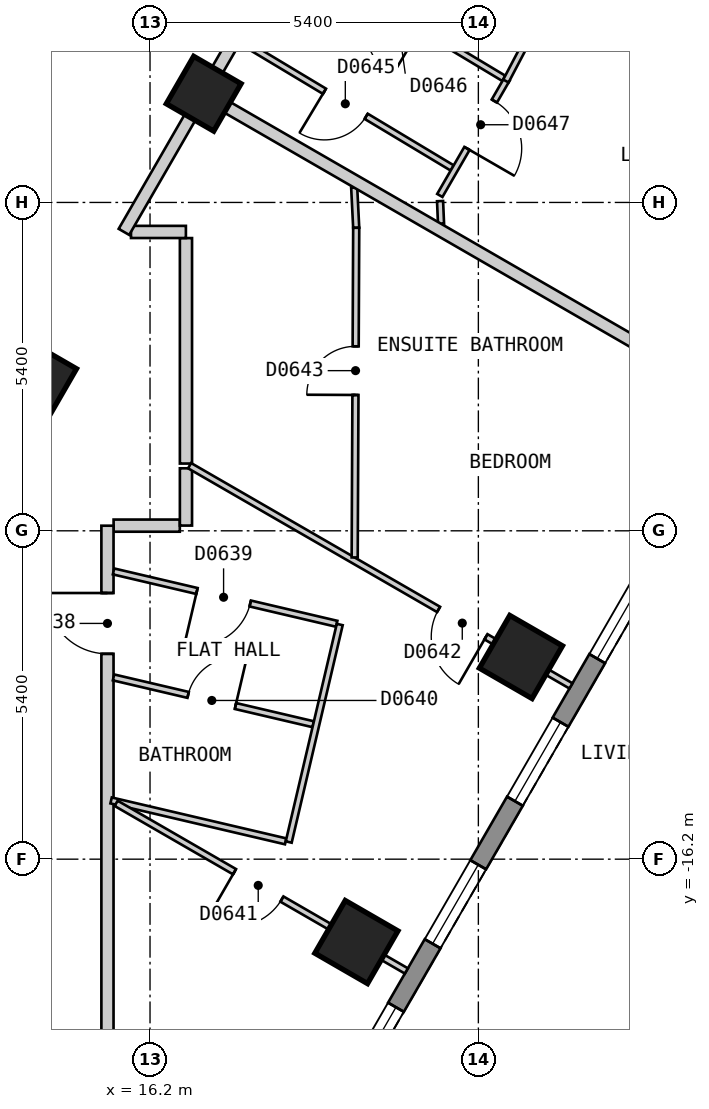
"""IFC4 building model, lengths in metres.
Left out: names, types, materials, properties, quantities, classifications, styles, units other than length and angle.
Written with IfcOpenShell. Run it as: python <this file> out.ifc"""

import sys

from ifc_helpers import new_model, si_unit, direction, frame, frame_2d, origin, origin_2d, place, context, subcontext, project, spatial, polyline, rectangle, outline, extrude, element, fill, save


model = new_model("IFC4")
c1 = context("Model", 3, precision=1e-05, world=origin(), true_north=direction((0.0, 1.0)))
c2 = subcontext(c1, "Body", "Model", "MODEL_VIEW")
j1 = project(units=[si_unit("LENGTHUNIT", "METRE"), si_unit("PLANEANGLEUNIT", "RADIAN")], contexts=[c1])
p1 = place(None, origin())
s1 = spatial("IfcSite", under=j1, at=p1, CompositionType="ELEMENT")
p2 = place(p1, origin())
s2 = spatial("IfcBuilding", under=s1, at=p2, CompositionType="ELEMENT")
p3 = place(p2, frame((0.0, 0.0, 75.0)))
s3 = spatial("IfcBuildingStorey", under=s2, at=p3, CompositionType="ELEMENT", Elevation=75.0)
for number, where, z_axis, x_axis in (
    (1, (19.594, -17.563, 0.0), (0.0, 0.0, 1.0), (0.5, 0.866, 0.0)),
    (2, (22.3, -12.875, 0.0), (0.0, 0.0, 1.0), (0.5, 0.866, 0.0)),
):
    element("IfcColumn", number, at=place(p3, frame(where, z_axis=z_axis, x_axis=x_axis)), inside=s3, PredefinedType="COLUMN", context=c2, shape_type="SweptSolid", body=[
        extrude(rectangle(XDim=1.0, YDim=1.0, at=origin_2d()), origin(), (0.0, 0.0, 1.0), 3.0),
    ])
for number, where, z_axis, x_axis in (
    (3, (14.376, -8.3, 0.0), (0.0, 0.0, 1.0), (0.5, 0.866, 0.0)),
    (4, (17.083, -3.612, 0.0), (0.0, 0.0, 1.0), (0.5, 0.866, 0.0)),
):
    element("IfcColumn", number, at=place(p3, frame(where, z_axis=z_axis, x_axis=x_axis)), inside=s3, PredefinedType="COLUMN", context=c2, shape_type="SweptSolid", body=[
        extrude(rectangle(XDim=0.9, YDim=0.9, at=origin_2d()), origin(), (0.0, 0.0, 1.0), 3.0),
    ])
p4 = place(p3, frame((17.479, -23.425, 0.0), z_axis=(0.0, 0.0, 1.0), x_axis=(0.500035407905, 0.866004960056, 0.0)))
e5 = element("IfcWall", 5, at=p4, inside=s3, PredefinedType="SOLIDWALL", context=c2, shape_type="SweptSolid", body=[
    extrude(outline(polyline([(0.0, -0.15), (23.094, -0.15), (23.014, 0.15), (0.08, 0.15), (0.0, -0.15)])), origin(), (0.0, 0.0, 1.0), 2.7),
])
p5 = place(p4, frame((1.324, 0.0, 0.15)))
e6 = element("IfcOpeningElement", 6, at=p5, cuts=e5, PredefinedType="OPENING", context=c2, shape_type="SweptSolid", body=[
    extrude(rectangle(XDim=1.5, YDim=2.1, at=frame_2d((0.75, 1.05))), frame((0.0, 0.16, 0.0), z_axis=(0.0, -1.0, 0.0), x_axis=(1.0, 0.0, 0.0)), (0.0, 0.0, 1.0), 0.32),
])
p6 = place(p4, frame((4.031, 0.0, 0.15)))
e7 = element("IfcOpeningElement", 7, at=p6, cuts=e5, PredefinedType="OPENING", context=c2, shape_type="SweptSolid", body=[
    extrude(rectangle(XDim=1.5, YDim=2.1, at=frame_2d((0.75, 1.05))), frame((0.0, 0.16, 0.0), z_axis=(0.0, -1.0, 0.0), x_axis=(1.0, 0.0, 0.0)), (0.0, 0.0, 1.0), 0.32),
])
p7 = place(p4, frame((6.737, 0.0, 0.15)))
e8 = element("IfcOpeningElement", 8, at=p7, cuts=e5, PredefinedType="OPENING", context=c2, shape_type="SweptSolid", body=[
    extrude(rectangle(XDim=1.5, YDim=2.1, at=frame_2d((0.75, 1.05))), frame((0.0, 0.16, 0.0), z_axis=(0.0, -1.0, 0.0), x_axis=(1.0, 0.0, 0.0)), (0.0, 0.0, 1.0), 0.32),
])
p8 = place(p4, frame((9.444, 0.0, 0.15)))
e9 = element("IfcOpeningElement", 9, at=p8, cuts=e5, PredefinedType="OPENING", context=c2, shape_type="SweptSolid", body=[
    extrude(rectangle(XDim=1.5, YDim=2.1, at=frame_2d((0.75, 1.05))), frame((0.0, 0.16, 0.0), z_axis=(0.0, -1.0, 0.0), x_axis=(1.0, 0.0, 0.0)), (0.0, 0.0, 1.0), 0.32),
])
p9 = place(p4, frame((12.151, 0.0, 0.15)))
e10 = element("IfcOpeningElement", 10, at=p9, cuts=e5, PredefinedType="OPENING", context=c2, shape_type="SweptSolid", body=[
    extrude(rectangle(XDim=1.5, YDim=2.1, at=frame_2d((0.75, 1.05))), frame((0.0, 0.16, 0.0), z_axis=(0.0, -1.0, 0.0), x_axis=(1.0, 0.0, 0.0)), (0.0, 0.0, 1.0), 0.32),
])
p10 = place(p4, frame((14.857, 0.0, 0.15)))
e11 = element("IfcOpeningElement", 11, at=p10, cuts=e5, PredefinedType="OPENING", context=c2, shape_type="SweptSolid", body=[
    extrude(rectangle(XDim=1.5, YDim=2.1, at=frame_2d((0.75, 1.05))), frame((0.0, 0.16, 0.0), z_axis=(0.0, -1.0, 0.0), x_axis=(1.0, 0.0, 0.0)), (0.0, 0.0, 1.0), 0.32),
])
p11 = place(p4, frame((17.564, 0.0, 0.15)))
e12 = element("IfcOpeningElement", 12, at=p11, cuts=e5, PredefinedType="OPENING", context=c2, shape_type="SweptSolid", body=[
    extrude(rectangle(XDim=1.5, YDim=2.1, at=frame_2d((0.75, 1.05))), frame((0.0, 0.16, 0.0), z_axis=(0.0, -1.0, 0.0), x_axis=(1.0, 0.0, 0.0)), (0.0, 0.0, 1.0), 0.32),
])
p12 = place(p4, frame((20.271, 0.0, 0.15)))
e13 = element("IfcOpeningElement", 13, at=p12, cuts=e5, PredefinedType="OPENING", context=c2, shape_type="SweptSolid", body=[
    extrude(rectangle(XDim=1.5, YDim=2.1, at=frame_2d((0.75, 1.05))), frame((0.0, 0.16, 0.0), z_axis=(0.0, -1.0, 0.0), x_axis=(1.0, 0.0, 0.0)), (0.0, 0.0, 1.0), 0.32),
])
p13 = place(p3, frame((16.791, -5.986, 0.0), z_axis=(0.0, 0.0, 1.0), x_axis=(0.0, -1.0, 0.0)))
e14 = element("IfcWall", 14, at=p13, inside=s3, PredefinedType="PARTITIONING", context=c2, shape_type="SweptSolid", body=[
    extrude(rectangle(XDim=3.708, YDim=0.2, at=frame_2d((1.854, 0.0))), origin(), (0.0, 0.0, 1.0), 2.7),
])
p14 = place(p3, frame((15.887, -5.885, 0.0), z_axis=(0.0, 0.0, 1.0), x_axis=(1.0, 0.0, 0.0)))
e15 = element("IfcWall", 15, at=p14, inside=s3, PredefinedType="PARTITIONING", context=c2, shape_type="SweptSolid", body=[
    extrude(rectangle(XDim=0.903, YDim=0.2, at=frame_2d((0.452, 0.0))), origin(), (0.0, 0.0, 1.0), 2.7),
])
p15 = place(p3, frame((15.601, -10.715, 0.0), z_axis=(0.0, 0.0, 1.0), x_axis=(1.0, 0.0, 0.0)))
e16 = element("IfcWall", 16, at=p15, inside=s3, PredefinedType="PARTITIONING", context=c2, shape_type="SweptSolid", body=[
    extrude(rectangle(XDim=1.089, YDim=0.2, at=frame_2d((0.544, 0.0))), origin(), (0.0, 0.0, 1.0), 2.7),
])
p16 = place(p3, frame((15.771, -5.884, 0.0), z_axis=(0.0, 0.0, 1.0), x_axis=(0.499939494019, 0.866060334111, 0.0)))
e17 = element("IfcWall", 17, at=p16, inside=s3, PredefinedType="PARTITIONING", context=c2, shape_type="SweptSolid", body=[
    extrude(rectangle(XDim=5.583, YDim=0.2, at=frame_2d((2.792, 0.0))), origin(), (0.0, 0.0, 1.0), 2.7),
])
p17 = place(p16, frame((4.03, 0.0, 0.0)))
e18 = element("IfcOpeningElement", 18, at=p17, cuts=e17, PredefinedType="OPENING", context=c2, shape_type="SweptSolid", body=[
    extrude(rectangle(XDim=1.0, YDim=2.1, at=frame_2d((0.5, 1.05))), frame((0.0, 0.11, 0.0), z_axis=(0.0, -1.0, 0.0), x_axis=(1.0, 0.0, 0.0)), (0.0, 0.0, 1.0), 0.22),
])
p18 = place(p3, frame((15.5, -21.199, 0.0), z_axis=(0.0, 0.0, 1.0), x_axis=(0.0, 1.0, 0.0)))
e19 = element("IfcWall", 19, at=p18, inside=s3, PredefinedType="PARTITIONING", context=c2, shape_type="SweptSolid", body=[
    extrude(rectangle(XDim=10.483, YDim=0.2, at=frame_2d((5.241, 0.0))), origin(), (0.0, 0.0, 1.0), 2.7),
])
p19 = place(p18, frame((8.376, 0.0, 0.0)))
e20 = element("IfcOpeningElement", 20, at=p19, cuts=e19, PredefinedType="OPENING", context=c2, shape_type="SweptSolid", body=[
    extrude(rectangle(XDim=1.0, YDim=2.1, at=frame_2d((0.5, 1.05))), frame((0.0, 0.11, 0.0), z_axis=(0.0, -1.0, 0.0), x_axis=(1.0, 0.0, 0.0)), (0.0, 0.0, 1.0), 0.22),
])
p20 = place(p3, frame((16.791, -10.714, 0.0), z_axis=(0.0, 0.0, 1.0), x_axis=(0.0, 1.0, 0.0)))
e21 = element("IfcWall", 21, at=p20, inside=s3, PredefinedType="PARTITIONING", context=c2, shape_type="SweptSolid", body=[
    extrude(rectangle(XDim=0.942, YDim=0.2, at=frame_2d((0.471, 0.0))), origin(), (0.0, 0.0, 1.0), 2.7),
])
p21 = place(p3, frame((19.558, -5.156, 0.0), z_axis=(0.0, 0.0, 1.0), x_axis=(0.04980880462, -0.998758771167, 0.0)))
e22 = element("IfcWall", 22, at=p21, inside=s3, PredefinedType="PARTITIONING", context=c2, shape_type="SweptSolid", body=[
    extrude(rectangle(XDim=0.662, YDim=0.1, at=frame_2d((0.331, 0.0))), origin(), (0.0, 0.0, 1.0), 2.7),
])
p22 = place(p3, frame((20.97, -5.378, 0.0), z_axis=(0.0, 0.0, 1.0), x_axis=(0.043266532348, -0.999063565134, 0.0)))
e23 = element("IfcWall", 23, at=p22, inside=s3, PredefinedType="PARTITIONING", context=c2, shape_type="SweptSolid", body=[
    extrude(rectangle(XDim=0.372, YDim=0.1, at=frame_2d((0.186, 0.0))), origin(), (0.0, 0.0, 1.0), 2.7),
])
p23 = place(p3, frame((15.6, -11.468, 0.0), z_axis=(0.0, 0.0, 1.0), x_axis=(0.973560523801, -0.228429215503, 0.0)))
e24 = element("IfcWall", 24, at=p23, inside=s3, PredefinedType="PARTITIONING", context=c2, shape_type="SweptSolid", body=[
    extrude(rectangle(XDim=3.77, YDim=0.1, at=frame_2d((1.885, 0.0))), origin(), (0.0, 0.0, 1.0), 2.7),
])
p24 = place(p23, frame((1.409, 0.0, 0.0)))
e25 = element("IfcOpeningElement", 25, at=p24, cuts=e24, PredefinedType="OPENING", context=c2, shape_type="SweptSolid", body=[
    extrude(rectangle(XDim=0.9, YDim=2.1, at=frame_2d((0.45, 1.05))), frame((0.0, 0.06, 0.0), z_axis=(0.0, -1.0, 0.0), x_axis=(1.0, 0.0, 0.0)), (0.0, 0.0, 1.0), 0.12),
])
p25 = place(p3, frame((15.6, -13.211, 0.0), z_axis=(0.0, 0.0, 1.0), x_axis=(0.973593440667, -0.228288879032, 0.0)))
e26 = element("IfcWall", 26, at=p25, inside=s3, PredefinedType="PARTITIONING", context=c2, shape_type="SweptSolid", body=[
    extrude(rectangle(XDim=3.373, YDim=0.1, at=frame_2d((1.687, 0.0))), origin(), (0.0, 0.0, 1.0), 2.7),
])
p26 = place(p25, frame((1.26, 0.0, 0.0)))
e27 = element("IfcOpeningElement", 27, at=p26, cuts=e26, PredefinedType="OPENING", context=c2, shape_type="SweptSolid", body=[
    extrude(rectangle(XDim=0.8, YDim=2.1, at=frame_2d((0.4, 1.05))), frame((0.0, 0.06, 0.0), z_axis=(0.0, -1.0, 0.0), x_axis=(1.0, 0.0, 0.0)), (0.0, 0.0, 1.0), 0.12),
])
p27 = place(p3, frame((15.56, -15.234, 0.0), z_axis=(0.0, 0.0, 1.0), x_axis=(0.973598200068, -0.228268580457, 0.0)))
e28 = element("IfcWall", 28, at=p27, inside=s3, PredefinedType="PARTITIONING", context=c2, shape_type="SweptSolid", body=[
    extrude(rectangle(XDim=2.949, YDim=0.1, at=frame_2d((1.474, 0.0))), origin(), (0.0, 0.0, 1.0), 2.7),
])
p28 = place(p3, frame((15.643, -15.282, 0.0), z_axis=(0.0, 0.0, 1.0), x_axis=(0.865990833325, -0.500059873013, 0.0)))
e29 = element("IfcWall", 29, at=p28, inside=s3, PredefinedType="PARTITIONING", context=c2, shape_type="SweptSolid", body=[
    extrude(rectangle(XDim=5.511, YDim=0.1, at=frame_2d((2.756, 0.0))), origin(), (0.0, 0.0, 1.0), 2.7),
])
p29 = place(p28, frame((2.248, 0.0, 0.0)))
e30 = element("IfcOpeningElement", 30, at=p29, cuts=e29, PredefinedType="OPENING", context=c2, shape_type="SweptSolid", body=[
    extrude(rectangle(XDim=0.9, YDim=2.1, at=frame_2d((0.45, 1.05))), frame((0.0, 0.06, 0.0), z_axis=(0.0, -1.0, 0.0), x_axis=(1.0, 0.0, 0.0)), (0.0, 0.0, 1.0), 0.12),
])
p30 = place(p3, frame((16.851, -9.729, 0.0), z_axis=(0.0, 0.0, 1.0), x_axis=(0.866027278279, -0.499996753267, 0.0)))
e31 = element("IfcWall", 31, at=p30, inside=s3, PredefinedType="PARTITIONING", context=c2, shape_type="SweptSolid", body=[
    extrude(rectangle(XDim=7.242, YDim=0.1, at=frame_2d((3.621, 0.0))), origin(), (0.0, 0.0, 1.0), 2.7),
])
p31 = place(p30, frame((4.728, 0.0, 0.0)))
e32 = element("IfcOpeningElement", 32, at=p31, cuts=e31, PredefinedType="OPENING", context=c2, shape_type="SweptSolid", body=[
    extrude(rectangle(XDim=0.9, YDim=2.1, at=frame_2d((0.45, 1.05))), frame((0.0, 0.06, 0.0), z_axis=(0.0, -1.0, 0.0), x_axis=(1.0, 0.0, 0.0)), (0.0, 0.0, 1.0), 0.12),
])
p32 = place(p3, frame((17.697, -2.748, 0.0), z_axis=(0.0, 0.0, 1.0), x_axis=(0.857359945576, -0.514717324093, 0.0)))
e33 = element("IfcWall", 33, at=p32, inside=s3, PredefinedType="PARTITIONING", context=c2, shape_type="SweptSolid", body=[
    extrude(rectangle(XDim=4.051, YDim=0.1, at=frame_2d((2.025, 0.0))), origin(), (0.0, 0.0, 1.0), 2.7),
])
p33 = place(p32, frame((1.6, 0.0, 0.0)))
e34 = element("IfcOpeningElement", 34, at=p33, cuts=e33, PredefinedType="OPENING", context=c2, shape_type="SweptSolid", body=[
    extrude(rectangle(XDim=0.8, YDim=2.1, at=frame_2d((0.4, 1.05))), frame((0.0, 0.06, 0.0), z_axis=(0.0, -1.0, 0.0), x_axis=(1.0, 0.0, 0.0)), (0.0, 0.0, 1.0), 0.12),
])
p34 = place(p3, frame((18.547, -1.275, 0.0), z_axis=(0.0, 0.0, 1.0), x_axis=(0.85733334763, -0.514761625456, 0.0)))
e35 = element("IfcWall", 35, at=p34, inside=s3, PredefinedType="PARTITIONING", context=c2, shape_type="SweptSolid", body=[
    extrude(rectangle(XDim=4.051, YDim=0.1, at=frame_2d((2.025, 0.0))), origin(), (0.0, 0.0, 1.0), 2.7),
])
p35 = place(p34, frame((1.55, 0.0, 0.0)))
e36 = element("IfcOpeningElement", 36, at=p35, cuts=e35, PredefinedType="OPENING", context=c2, shape_type="SweptSolid", body=[
    extrude(rectangle(XDim=0.9, YDim=2.1, at=frame_2d((0.45, 1.05))), frame((0.0, 0.06, 0.0), z_axis=(0.0, -1.0, 0.0), x_axis=(1.0, 0.0, 0.0)), (0.0, 0.0, 1.0), 0.12),
])
p36 = place(p3, frame((20.966, -5.285, 0.0), z_axis=(0.0, 0.0, 1.0), x_axis=(0.500244510215, 0.865884189716, 0.0)))
e37 = element("IfcWall", 37, at=p36, inside=s3, PredefinedType="PARTITIONING", context=c2, shape_type="SweptSolid", body=[
    extrude(rectangle(XDim=2.213, YDim=0.1, at=frame_2d((1.106, 0.0))), origin(), (0.0, 0.0, 1.0), 2.7),
])
p37 = place(p36, frame((0.893, 0.0, 0.0)))
e38 = element("IfcOpeningElement", 38, at=p37, cuts=e37, PredefinedType="OPENING", context=c2, shape_type="SweptSolid", body=[
    extrude(rectangle(XDim=0.9, YDim=2.1, at=frame_2d((0.45, 1.05))), frame((0.0, 0.06, 0.0), z_axis=(0.0, -1.0, 0.0), x_axis=(1.0, 0.0, 0.0)), (0.0, 0.0, 1.0), 0.12),
])
p38 = place(p3, frame((22.053, -3.403, 0.0), z_axis=(0.0, 0.0, 1.0), x_axis=(0.465190117005, 0.885210796952, 0.0)))
e39 = element("IfcWall", 39, at=p38, inside=s3, PredefinedType="PARTITIONING", context=c2, shape_type="SweptSolid", body=[
    extrude(rectangle(XDim=2.659, YDim=0.1, at=frame_2d((1.33, 0.0))), origin(), (0.0, 0.0, 1.0), 2.7),
])
p39 = place(p3, frame((18.481, -15.918, 0.0), z_axis=(0.0, 0.0, 1.0), x_axis=(0.228391116115, 0.97356946238, 0.0)))
e40 = element("IfcWall", 40, at=p39, inside=s3, PredefinedType="PARTITIONING", context=c2, shape_type="SweptSolid", body=[
    extrude(rectangle(XDim=3.674, YDim=0.1, at=frame_2d((1.837, 0.0))), origin(), (0.0, 0.0, 1.0), 2.7),
])
p40 = place(p3, frame((19.566, -11.238, 0.0), z_axis=(0.0, 0.0, 1.0), x_axis=(0.004638545009, 0.999989241892, 0.0)))
e41 = element("IfcWall", 41, at=p40, inside=s3, PredefinedType="PARTITIONING", context=c2, shape_type="SweptSolid", body=[
    extrude(rectangle(XDim=5.421, YDim=0.1, at=frame_2d((2.71, 0.0))), origin(), (0.0, 0.0, 1.0), 2.7),
])
p41 = place(p40, frame((2.672, 0.0, 0.0)))
e42 = element("IfcOpeningElement", 42, at=p41, cuts=e41, PredefinedType="OPENING", context=c2, shape_type="SweptSolid", body=[
    extrude(rectangle(XDim=0.8, YDim=2.1, at=frame_2d((0.4, 1.05))), frame((0.0, 0.06, 0.0), z_axis=(0.0, -1.0, 0.0), x_axis=(1.0, 0.0, 0.0)), (0.0, 0.0, 1.0), 0.12),
])
p42 = place(p3, frame((17.169, -3.662, 0.0), z_axis=(0.0, 0.0, 1.0), x_axis=(0.866047370643, -0.499961950354, 0.0)))
e43 = element("IfcWall", 43, at=p42, inside=s3, PredefinedType="PARTITIONING", context=c2, shape_type="SweptSolid", body=[
    extrude(rectangle(XDim=10.001, YDim=0.2, at=frame_2d((5.0, 0.0))), origin(), (0.0, 0.0, 1.0), 2.7),
])
p43 = place(p6, origin())
e44 = element("IfcWindow", 44, at=p43, inside=s3, PartitioningType="SINGLE_PANEL", PredefinedType="WINDOW", context=c2, shape_type="SweptSolid", body=[
    extrude(rectangle(XDim=1.5, YDim=2.1, at=frame_2d((0.75, 1.05))), frame((0.0, 0.03, 0.0), z_axis=(0.0, -1.0, 0.0), x_axis=(1.0, 0.0, 0.0)), (0.0, 0.0, 1.0), 0.06),
])
fill(e7, e44)
p44 = place(p7, origin())
e45 = element("IfcWindow", 45, at=p44, inside=s3, PartitioningType="SINGLE_PANEL", PredefinedType="WINDOW", context=c2, shape_type="SweptSolid", body=[
    extrude(rectangle(XDim=1.5, YDim=2.1, at=frame_2d((0.75, 1.05))), frame((0.0, 0.03, 0.0), z_axis=(0.0, -1.0, 0.0), x_axis=(1.0, 0.0, 0.0)), (0.0, 0.0, 1.0), 0.06),
])
fill(e8, e45)
p45 = place(p8, origin())
e46 = element("IfcWindow", 46, at=p45, inside=s3, PartitioningType="SINGLE_PANEL", PredefinedType="WINDOW", context=c2, shape_type="SweptSolid", body=[
    extrude(rectangle(XDim=1.5, YDim=2.1, at=frame_2d((0.75, 1.05))), frame((0.0, 0.03, 0.0), z_axis=(0.0, -1.0, 0.0), x_axis=(1.0, 0.0, 0.0)), (0.0, 0.0, 1.0), 0.06),
])
fill(e9, e46)
p46 = place(p9, origin())
e47 = element("IfcWindow", 47, at=p46, inside=s3, PartitioningType="SINGLE_PANEL", PredefinedType="WINDOW", context=c2, shape_type="SweptSolid", body=[
    extrude(rectangle(XDim=1.5, YDim=2.1, at=frame_2d((0.75, 1.05))), frame((0.0, 0.03, 0.0), z_axis=(0.0, -1.0, 0.0), x_axis=(1.0, 0.0, 0.0)), (0.0, 0.0, 1.0), 0.06),
])
fill(e10, e47)
p47 = place(p19, origin())
e48 = element("IfcDoor", 48, at=p47, inside=s3, OperationType="SINGLE_SWING_RIGHT", PredefinedType="DOOR", context=c2, shape_type="SweptSolid", body=[
    extrude(rectangle(XDim=1.0, YDim=2.1, at=frame_2d((0.5, 1.05))), frame((0.0, 0.025, 0.0), z_axis=(0.0, -1.0, 0.0), x_axis=(1.0, 0.0, 0.0)), (0.0, 0.0, 1.0), 0.05),
])
fill(e20, e48)
p48 = place(p24, origin())
e49 = element("IfcDoor", 49, at=p48, inside=s3, OperationType="SINGLE_SWING_LEFT", PredefinedType="DOOR", context=c2, shape_type="SweptSolid", body=[
    extrude(rectangle(XDim=0.9, YDim=2.1, at=frame_2d((0.45, 1.05))), frame((0.0, 0.025, 0.0), z_axis=(0.0, -1.0, 0.0), x_axis=(1.0, 0.0, 0.0)), (0.0, 0.0, 1.0), 0.05),
])
fill(e25, e49)
p49 = place(p26, origin())
e50 = element("IfcDoor", 50, at=p49, inside=s3, OperationType="SINGLE_SWING_RIGHT", PredefinedType="DOOR", context=c2, shape_type="SweptSolid", body=[
    extrude(rectangle(XDim=0.8, YDim=2.1, at=frame_2d((0.4, 1.05))), frame((0.0, 0.025, 0.0), z_axis=(0.0, -1.0, 0.0), x_axis=(1.0, 0.0, 0.0)), (0.0, 0.0, 1.0), 0.05),
])
fill(e27, e50)
p50 = place(p29, origin())
e51 = element("IfcDoor", 51, at=p50, inside=s3, OperationType="SINGLE_SWING_LEFT", PredefinedType="DOOR", context=c2, shape_type="SweptSolid", body=[
    extrude(rectangle(XDim=0.9, YDim=2.1, at=frame_2d((0.45, 1.05))), frame((0.0, 0.025, 0.0), z_axis=(0.0, -1.0, 0.0), x_axis=(1.0, 0.0, 0.0)), (0.0, 0.0, 1.0), 0.05),
])
fill(e30, e51)
p51 = place(p31, origin())
e52 = element("IfcDoor", 52, at=p51, inside=s3, OperationType="SINGLE_SWING_RIGHT", PredefinedType="DOOR", context=c2, shape_type="SweptSolid", body=[
    extrude(rectangle(XDim=0.9, YDim=2.1, at=frame_2d((0.45, 1.05))), frame((0.0, 0.025, 0.0), z_axis=(0.0, -1.0, 0.0), x_axis=(1.0, 0.0, 0.0)), (0.0, 0.0, 1.0), 0.05),
])
fill(e32, e52)
p52 = place(p41, origin())
e53 = element("IfcDoor", 53, at=p52, inside=s3, OperationType="SINGLE_SWING_LEFT", PredefinedType="DOOR", context=c2, shape_type="SweptSolid", body=[
    extrude(rectangle(XDim=0.8, YDim=2.1, at=frame_2d((0.4, 1.05))), frame((0.0, 0.025, 0.0), z_axis=(0.0, -1.0, 0.0), x_axis=(1.0, 0.0, 0.0)), (0.0, 0.0, 1.0), 0.05),
])
fill(e42, e53)
p53 = place(p33, origin())
e54 = element("IfcDoor", 54, at=p53, inside=s3, OperationType="SINGLE_SWING_LEFT", PredefinedType="DOOR", context=c2, shape_type="SweptSolid", body=[
    extrude(rectangle(XDim=0.8, YDim=2.1, at=frame_2d((0.4, 1.05))), frame((0.0, 0.025, 0.0), z_axis=(0.0, -1.0, 0.0), x_axis=(1.0, 0.0, 0.0)), (0.0, 0.0, 1.0), 0.05),
])
fill(e34, e54)
p54 = place(p37, origin())
e55 = element("IfcDoor", 55, at=p54, inside=s3, OperationType="SINGLE_SWING_LEFT", PredefinedType="DOOR", context=c2, shape_type="SweptSolid", body=[
    extrude(rectangle(XDim=0.9, YDim=2.1, at=frame_2d((0.45, 1.05))), frame((0.0, 0.025, 0.0), z_axis=(0.0, -1.0, 0.0), x_axis=(1.0, 0.0, 0.0)), (0.0, 0.0, 1.0), 0.05),
])
fill(e38, e55)
save(model, sys.argv[1])
